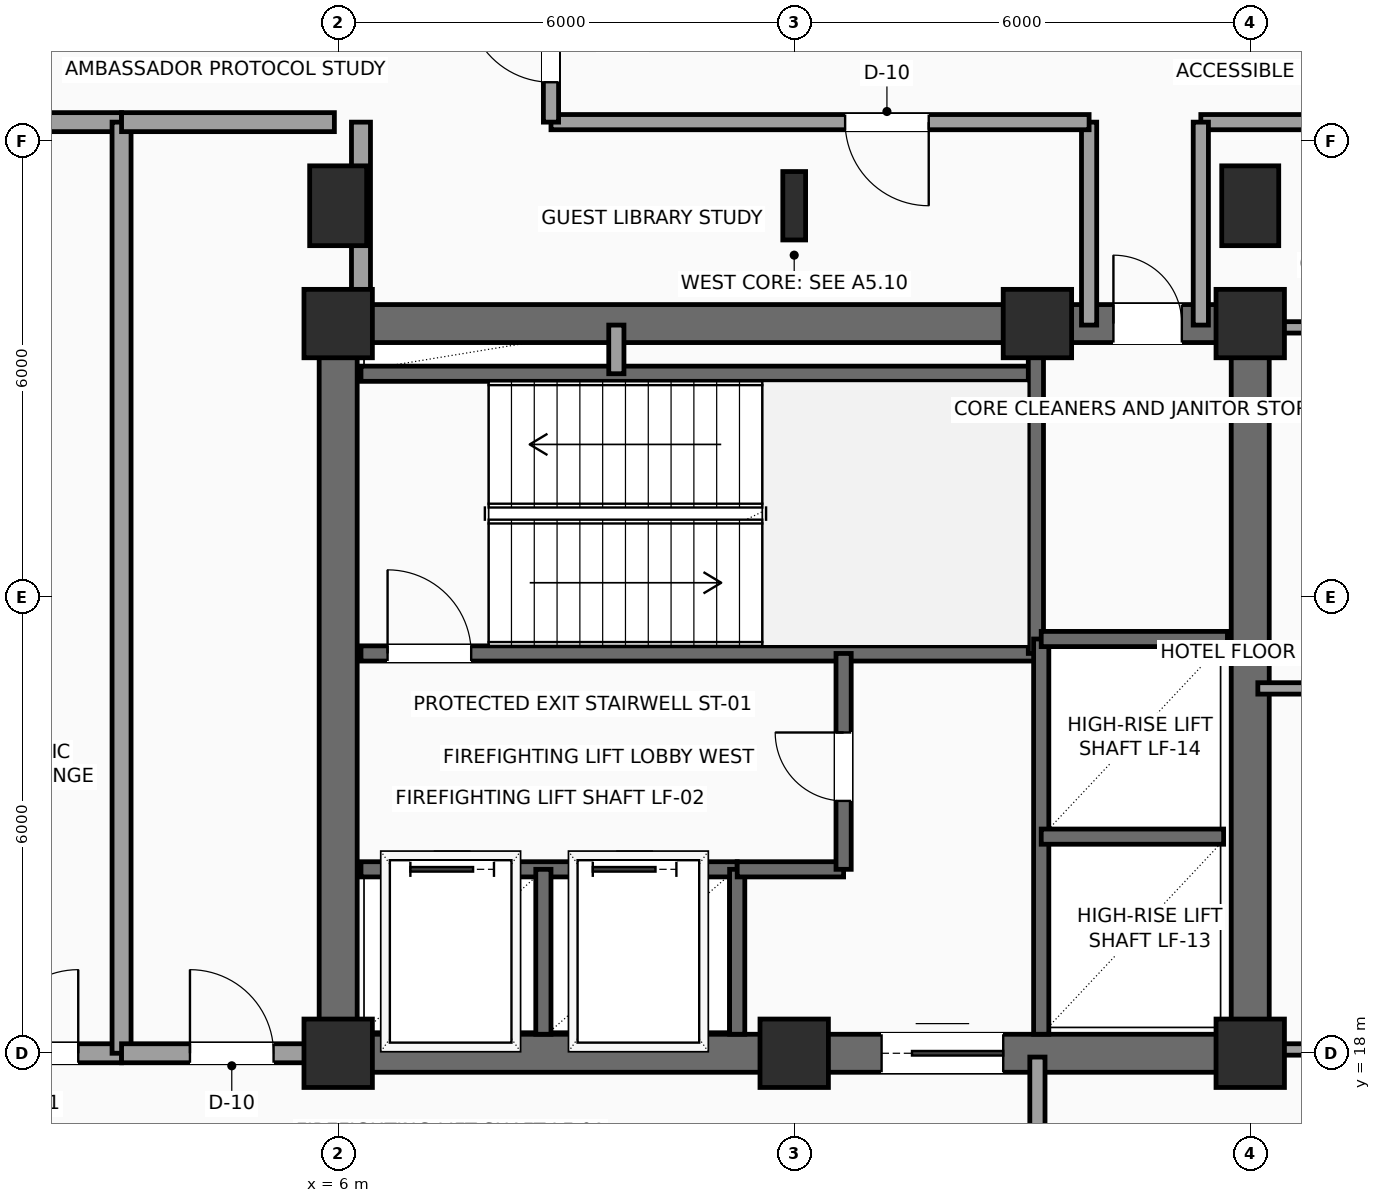
"""IFC4 building model, lengths in metres.
Left out: names, types, materials, properties, quantities, classifications, styles, units other than length and angle.
Written with IfcOpenShell. Run it as: python <this file> out.ifc"""

import sys

from ifc_helpers import new_model, si_unit, direction, frame, frame_2d, origin, origin_2d, place, context, subcontext, project, spatial, rectangle, i_section, extrude, element, fill, save


model = new_model("IFC4")
c1 = context("Model", 3, precision=1e-05, world=origin(), true_north=direction((0.0, 1.0)))
c2 = subcontext(c1, "Body", "Model", "MODEL_VIEW")
j1 = project(units=[si_unit("LENGTHUNIT", "METRE"), si_unit("PLANEANGLEUNIT", "RADIAN")], contexts=[c1])
p1 = place(None, origin())
s1 = spatial("IfcSite", under=j1, at=p1, CompositionType="ELEMENT")
p2 = place(p1, origin())
s2 = spatial("IfcBuilding", under=s1, at=p2, CompositionType="ELEMENT")
p3 = place(p2, frame((0.0, 0.0, 180.45)))
s3 = spatial("IfcBuildingStorey", under=s2, at=p3, CompositionType="ELEMENT", Elevation=180.45)
for number, where, z_axis, x_axis in (
    (1, (6.0, 18.0, 0.0), (0.0, 0.0, 1.0), (1.0, 0.0, 0.0)),
    (2, (12.0, 18.0, 0.0), (0.0, 0.0, 1.0), (1.0, 0.0, 0.0)),
    (3, (18.0, 18.0, 0.0), (0.0, 0.0, 1.0), (1.0, 0.0, 0.0)),
    (4, (6.0, 27.6, 0.0), (0.0, 0.0, 1.0), (1.0, 0.0, 0.0)),
    (5, (15.2, 27.6, 0.0), (0.0, 0.0, 1.0), (1.0, 0.0, 0.0)),
    (6, (18.0, 27.6, 0.0), (0.0, 0.0, 1.0), (1.0, 0.0, 0.0)),
):
    element("IfcColumn", number, at=place(p3, frame(where, z_axis=z_axis, x_axis=x_axis)), inside=s3, PredefinedType="COLUMN", context=c2, shape_type="SweptSolid", body=[
        extrude(rectangle(XDim=0.9, YDim=0.9, at=origin_2d()), origin(), (0.0, 0.0, 1.0), 3.75),
    ])
p4 = place(p3, frame((6.0, 29.15, 0.0), z_axis=(0.0, 0.0, 1.0), x_axis=(1.0, 0.0, 0.0)))
e7 = element("IfcColumn", 7, at=p4, inside=s3, PredefinedType="COLUMN", context=c2, shape_type="SweptSolid", body=[
    extrude(rectangle(XDim=0.75, YDim=1.05, at=origin_2d()), origin(), (0.0, 0.0, 1.0), 3.75),
])
p5 = place(p3, frame((12.0, 29.15, 0.0), z_axis=(0.0, 0.0, 1.0), x_axis=(1.0, 0.0, 0.0)))
e8 = element("IfcColumn", 8, at=p5, inside=s3, PredefinedType="COLUMN", context=c2, shape_type="SweptSolid", body=[
    extrude(i_section(OverallWidth=0.3, OverallDepth=0.9, WebThickness=0.019, FlangeThickness=0.035, FilletRadius=0.03, at=origin_2d()), origin(), (0.0, 0.0, 1.0), 3.75),
])
p6 = place(p3, frame((18.0, 29.15, 0.0), z_axis=(0.0, 0.0, 1.0), x_axis=(1.0, 0.0, 0.0)))
e9 = element("IfcColumn", 9, at=p6, inside=s3, PredefinedType="COLUMN", context=c2, shape_type="SweptSolid", body=[
    extrude(rectangle(XDim=0.75, YDim=1.05, at=origin_2d()), origin(), (0.0, 0.0, 1.0), 3.75),
])
p7 = place(p3, frame((6.0, 18.0, 0.0), z_axis=(0.0, 0.0, 1.0), x_axis=(1.0, 0.0, 0.0)))
e10 = element("IfcWall", 10, at=p7, inside=s3, PredefinedType="SHEAR", context=c2, shape_type="SweptSolid", body=[
    extrude(rectangle(XDim=12.0, YDim=0.5, at=frame_2d((6.0, 0.0))), origin(), (0.0, 0.0, 1.0), 3.54),
])
p8 = place(p7, frame((7.15, 0.0, 0.0)))
e11 = element("IfcOpeningElement", 11, at=p8, cuts=e10, PredefinedType="OPENING", context=c2, shape_type="SweptSolid", body=[
    extrude(rectangle(XDim=1.6, YDim=2.3, at=frame_2d((0.8, 1.15))), frame((0.0, 0.26, 0.0), z_axis=(0.0, -1.0, 0.0), x_axis=(1.0, 0.0, 0.0)), (0.0, 0.0, 1.0), 0.52),
])
p9 = place(p3, frame((6.0, 27.6, 0.0), z_axis=(0.0, 0.0, 1.0), x_axis=(1.0, 0.0, 0.0)))
e12 = element("IfcWall", 12, at=p9, inside=s3, PredefinedType="SHEAR", context=c2, shape_type="SweptSolid", body=[
    extrude(rectangle(XDim=12.0, YDim=0.5, at=frame_2d((6.0, 0.0))), origin(), (0.0, 0.0, 1.0), 3.54),
])
p10 = place(p9, frame((10.2, 0.0, 0.0)))
e13 = element("IfcOpeningElement", 13, at=p10, cuts=e12, PredefinedType="OPENING", context=c2, shape_type="SweptSolid", body=[
    extrude(rectangle(XDim=0.9, YDim=2.15, at=frame_2d((0.45, 1.075))), frame((0.0, 0.26, 0.0), z_axis=(0.0, -1.0, 0.0), x_axis=(1.0, 0.0, 0.0)), (0.0, 0.0, 1.0), 0.52),
])
for number, where, z_axis, x_axis in (
    (14, (6.0, 18.0, 0.0), (0.0, 0.0, 1.0), (0.0, 1.0, 0.0)),
    (15, (18.0, 18.0, 0.0), (0.0, 0.0, 1.0), (0.0, 1.0, 0.0)),
):
    element("IfcWall", number, at=place(p3, frame(where, z_axis=z_axis, x_axis=x_axis)), inside=s3, PredefinedType="SHEAR", context=c2, shape_type="SweptSolid", body=[
        extrude(rectangle(XDim=9.6, YDim=0.5, at=frame_2d((4.8, 0.0))), origin(), (0.0, 0.0, 1.0), 3.54),
    ])
p11 = place(p3, frame((6.3, 23.26, 0.0), z_axis=(0.0, 0.0, 1.0), x_axis=(1.0, 0.0, 0.0)))
e16 = element("IfcWall", 16, at=p11, inside=s3, PredefinedType="SHEAR", context=c2, shape_type="SweptSolid", body=[
    extrude(rectangle(XDim=8.88, YDim=0.2, at=frame_2d((4.44, 0.0))), origin(), (0.0, 0.0, 1.0), 3.54),
])
p12 = place(p11, frame((0.35, 0.0, 0.0)))
e17 = element("IfcOpeningElement", 17, at=p12, cuts=e16, PredefinedType="OPENING", context=c2, shape_type="SweptSolid", body=[
    extrude(rectangle(XDim=1.1, YDim=2.2, at=frame_2d((0.55, 1.1))), frame((0.0, 0.11, 0.0), z_axis=(0.0, -1.0, 0.0), x_axis=(1.0, 0.0, 0.0)), (0.0, 0.0, 1.0), 0.22),
])
p13 = place(p3, frame((6.3, 26.94, 0.0), z_axis=(0.0, 0.0, 1.0), x_axis=(1.0, 0.0, 0.0)))
e18 = element("IfcWall", 18, at=p13, inside=s3, PredefinedType="SHEAR", context=c2, shape_type="SweptSolid", body=[
    extrude(rectangle(XDim=8.88, YDim=0.2, at=frame_2d((4.44, 0.0))), origin(), (0.0, 0.0, 1.0), 3.54),
])
p14 = place(p3, frame((15.18, 23.26, 0.0), z_axis=(0.0, 0.0, 1.0), x_axis=(0.0, 1.0, 0.0)))
e19 = element("IfcWall", 19, at=p14, inside=s3, PredefinedType="SHEAR", context=c2, shape_type="SweptSolid", body=[
    extrude(rectangle(XDim=4.04, YDim=0.2, at=frame_2d((2.02, 0.0))), origin(), (0.0, 0.0, 1.0), 3.54),
])
p15 = place(p3, frame((6.3, 20.42, 0.0), z_axis=(0.0, 0.0, 1.0), x_axis=(1.0, 0.0, 0.0)))
e20 = element("IfcWall", 20, at=p15, inside=s3, PredefinedType="SHEAR", context=c2, shape_type="SweptSolid", body=[
    extrude(rectangle(XDim=4.95, YDim=0.2, at=frame_2d((2.475, 0.0))), origin(), (0.0, 0.0, 1.0), 3.54),
])
p16 = place(p15, frame((0.65, 0.0, 0.0)))
e21 = element("IfcOpeningElement", 21, at=p16, cuts=e20, PredefinedType="OPENING", context=c2, shape_type="SweptSolid", body=[
    extrude(rectangle(XDim=1.1, YDim=2.2, at=frame_2d((0.55, 1.1))), frame((0.0, 0.11, 0.0), z_axis=(0.0, -1.0, 0.0), x_axis=(1.0, 0.0, 0.0)), (0.0, 0.0, 1.0), 0.22),
])
p17 = place(p15, frame((3.05, 0.0, 0.0)))
e22 = element("IfcOpeningElement", 22, at=p17, cuts=e20, PredefinedType="OPENING", context=c2, shape_type="SweptSolid", body=[
    extrude(rectangle(XDim=1.1, YDim=2.2, at=frame_2d((0.55, 1.1))), frame((0.0, 0.11, 0.0), z_axis=(0.0, -1.0, 0.0), x_axis=(1.0, 0.0, 0.0)), (0.0, 0.0, 1.0), 0.22),
])
for number, where, z_axis, x_axis in (
    (23, (8.7, 18.25, 0.0), (0.0, 0.0, 1.0), (0.0, 1.0, 0.0)),
    (24, (11.25, 18.25, 0.0), (0.0, 0.0, 1.0), (0.0, 1.0, 0.0)),
):
    element("IfcWall", number, at=place(p3, frame(where, z_axis=z_axis, x_axis=x_axis)), inside=s3, PredefinedType="SHEAR", context=c2, shape_type="SweptSolid", body=[
        extrude(rectangle(XDim=2.17, YDim=0.2, at=frame_2d((1.085, 0.0))), origin(), (0.0, 0.0, 1.0), 3.54),
    ])
p18 = place(p3, frame((11.25, 20.42, 0.0), z_axis=(0.0, 0.0, 1.0), x_axis=(1.0, 0.0, 0.0)))
e25 = element("IfcWall", 25, at=p18, inside=s3, PredefinedType="SHEAR", context=c2, shape_type="SweptSolid", body=[
    extrude(rectangle(XDim=1.4, YDim=0.2, at=frame_2d((0.7, 0.0))), origin(), (0.0, 0.0, 1.0), 3.54),
])
p19 = place(p3, frame((12.65, 20.42, 0.0), z_axis=(0.0, 0.0, 1.0), x_axis=(0.0, 1.0, 0.0)))
e26 = element("IfcWall", 26, at=p19, inside=s3, PredefinedType="SHEAR", context=c2, shape_type="SweptSolid", body=[
    extrude(rectangle(XDim=2.84, YDim=0.2, at=frame_2d((1.42, 0.0))), origin(), (0.0, 0.0, 1.0), 3.54),
])
p20 = place(p19, frame((0.9, 0.0, 0.0)))
e27 = element("IfcOpeningElement", 27, at=p20, cuts=e26, PredefinedType="OPENING", context=c2, shape_type="SweptSolid", body=[
    extrude(rectangle(XDim=0.9, YDim=2.15, at=frame_2d((0.45, 1.075))), frame((0.0, 0.11, 0.0), z_axis=(0.0, -1.0, 0.0), x_axis=(1.0, 0.0, 0.0)), (0.0, 0.0, 1.0), 0.22),
])
p21 = place(p3, frame((9.66, 26.94, 0.0), z_axis=(0.0, 0.0, 1.0), x_axis=(0.0, 1.0, 0.0)))
e28 = element("IfcWall", 28, at=p21, inside=s3, PredefinedType="SOLIDWALL", context=c2, shape_type="SweptSolid", body=[
    extrude(rectangle(XDim=0.64, YDim=0.2, at=frame_2d((0.32, 0.0))), origin(), (0.0, 0.0, 1.0), 3.54),
])
p22 = place(p3, frame((15.25, 18.25, 0.0), z_axis=(0.0, 0.0, 1.0), x_axis=(0.0, 1.0, 0.0)))
e29 = element("IfcWall", 29, at=p22, inside=s3, PredefinedType="SHEAR", context=c2, shape_type="SweptSolid", body=[
    extrude(rectangle(XDim=5.2, YDim=0.2, at=frame_2d((2.6, 0.0))), origin(), (0.0, 0.0, 1.0), 3.54),
])
p23 = place(p3, frame((15.25, 20.85, 0.0), z_axis=(0.0, 0.0, 1.0), x_axis=(1.0, 0.0, 0.0)))
e30 = element("IfcWall", 30, at=p23, inside=s3, PredefinedType="SHEAR", context=c2, shape_type="SweptSolid", body=[
    extrude(rectangle(XDim=2.4, YDim=0.2, at=frame_2d((1.2, 0.0))), origin(), (0.0, 0.0, 1.0), 3.54),
])
p24 = place(p3, frame((15.25, 23.45, 0.0), z_axis=(0.0, 0.0, 1.0), x_axis=(1.0, 0.0, 0.0)))
e31 = element("IfcWall", 31, at=p24, inside=s3, PredefinedType="SHEAR", context=c2, shape_type="SweptSolid", body=[
    extrude(rectangle(XDim=2.45, YDim=0.2, at=frame_2d((1.225, 0.0))), origin(), (0.0, 0.0, 1.0), 3.54),
])
p25 = place(p3, frame((15.2, 17.95, 0.0), z_axis=(0.0, 0.0, 1.0), x_axis=(0.0, -1.0, 0.0)))
e32 = element("IfcWall", 32, at=p25, inside=s3, PredefinedType="SOLIDWALL", context=c2, shape_type="SweptSolid", body=[
    extrude(rectangle(XDim=1.7, YDim=0.2, at=frame_2d((0.85, 0.0))), origin(), (0.0, 0.0, 1.0), 3.54),
])
p26 = place(p3, frame((21.45, 30.25, 0.0), z_axis=(0.0, 0.0, 1.0), x_axis=(-1.0, 0.0, 0.0)))
e33 = element("IfcWall", 33, at=p26, inside=s3, PredefinedType="SOLIDWALL", context=c2, shape_type="SweptSolid", body=[
    extrude(rectangle(XDim=4.1, YDim=0.2, at=frame_2d((2.05, 0.0))), origin(), (0.0, 0.0, 1.0), 3.54),
])
p27 = place(p26, frame((1.55, 0.0, 0.0)))
e34 = element("IfcOpeningElement", 34, at=p27, cuts=e33, PredefinedType="OPENING", context=c2, shape_type="SweptSolid", body=[
    extrude(rectangle(XDim=1.1, YDim=2.25, at=frame_2d((0.55, 1.125))), frame((0.0, 0.11, 0.0), z_axis=(0.0, -1.0, 0.0), x_axis=(1.0, 0.0, 0.0)), (0.0, 0.0, 1.0), 0.22),
])
for number, where, z_axis, x_axis in (
    (35, (17.35, 30.25, 0.0), (0.0, 0.0, 1.0), (0.0, -1.0, 0.0)),
    (36, (15.88, 27.58, 0.0), (0.0, 0.0, 1.0), (0.0, 1.0, 0.0)),
):
    element("IfcWall", number, at=place(p3, frame(where, z_axis=z_axis, x_axis=x_axis)), inside=s3, PredefinedType="SOLIDWALL", context=c2, shape_type="SweptSolid", body=[
        extrude(rectangle(XDim=2.67, YDim=0.2, at=frame_2d((1.335, 0.0))), origin(), (0.0, 0.0, 1.0), 3.54),
    ])
p28 = place(p3, frame((15.88, 30.25, 0.0), z_axis=(0.0, 0.0, 1.0), x_axis=(-1.0, 0.0, 0.0)))
e37 = element("IfcWall", 37, at=p28, inside=s3, PredefinedType="SOLIDWALL", context=c2, shape_type="SweptSolid", body=[
    extrude(rectangle(XDim=7.08, YDim=0.2, at=frame_2d((3.54, 0.0))), origin(), (0.0, 0.0, 1.0), 3.54),
])
p29 = place(p28, frame((2.11, 0.0, 0.0)))
e38 = element("IfcOpeningElement", 38, at=p29, cuts=e37, PredefinedType="OPENING", context=c2, shape_type="SweptSolid", body=[
    extrude(rectangle(XDim=1.1, YDim=2.25, at=frame_2d((0.55, 1.125))), frame((0.0, 0.11, 0.0), z_axis=(0.0, -1.0, 0.0), x_axis=(1.0, 0.0, 0.0)), (0.0, 0.0, 1.0), 0.22),
])
p30 = place(p3, frame((8.8, 30.25, 0.0), z_axis=(0.0, 0.0, 1.0), x_axis=(0.0, 1.0, 0.0)))
e39 = element("IfcWall", 39, at=p30, inside=s3, PredefinedType="SOLIDWALL", context=c2, shape_type="SweptSolid", body=[
    extrude(rectangle(XDim=2.05, YDim=0.2, at=frame_2d((1.025, 0.0))), origin(), (0.0, 0.0, 1.0), 3.54),
])
p31 = place(p30, frame((0.525, 0.0, 0.0)))
e40 = element("IfcOpeningElement", 40, at=p31, cuts=e39, PredefinedType="OPENING", context=c2, shape_type="SweptSolid", body=[
    extrude(rectangle(XDim=1.1, YDim=2.25, at=frame_2d((0.55, 1.125))), frame((0.0, 0.11, 0.0), z_axis=(0.0, -1.0, 0.0), x_axis=(1.0, 0.0, 0.0)), (0.0, 0.0, 1.0), 0.22),
])
p32 = place(p3, frame((18.1, 18.05, 0.0), z_axis=(0.0, 0.0, 1.0), x_axis=(1.0, 0.0, 0.0)))
e41 = element("IfcWall", 41, at=p32, inside=s3, PredefinedType="PARTITIONING", context=c2, shape_type="SweptSolid", body=[
    extrude(rectangle(XDim=3.25, YDim=0.15, at=frame_2d((1.625, 0.0))), origin(), (0.0, 0.0, 1.0), 3.132),
])
for number, where, z_axis, x_axis in (
    (42, (18.1, 22.8, 0.0), (0.0, 0.0, 1.0), (1.0, 0.0, 0.0)),
    (43, (18.1, 27.55, 0.0), (0.0, 0.0, 1.0), (1.0, 0.0, 0.0)),
):
    element("IfcWall", number, at=place(p3, frame(where, z_axis=z_axis, x_axis=x_axis)), inside=s3, PredefinedType="PARTITIONING", context=c2, shape_type="SweptSolid", body=[
        extrude(rectangle(XDim=3.25, YDim=0.15, at=frame_2d((1.625, 0.0))), origin(), (0.0, 0.0, 1.0), 3.54),
    ])
p33 = place(p3, frame((0.3, 18.0, 0.0), z_axis=(0.0, 0.0, 1.0), x_axis=(1.0, 0.0, 0.0)))
e44 = element("IfcWall", 44, at=p33, inside=s3, PredefinedType="PARTITIONING", context=c2, shape_type="SweptSolid", body=[
    extrude(rectangle(XDim=2.85, YDim=0.25, at=frame_2d((1.425, 0.0))), origin(), (0.0, 0.0, 1.0), 3.132),
])
p34 = place(p33, frame((1.18, 0.0, 0.0)))
e45 = element("IfcOpeningElement", 45, at=p34, cuts=e44, PredefinedType="OPENING", context=c2, shape_type="SweptSolid", body=[
    extrude(rectangle(XDim=1.1, YDim=2.25, at=frame_2d((0.55, 1.125))), frame((0.0, 0.135, 0.0), z_axis=(0.0, -1.0, 0.0), x_axis=(1.0, 0.0, 0.0)), (0.0, 0.0, 1.0), 0.27),
])
p35 = place(p3, frame((0.3, 30.25, 0.0), z_axis=(0.0, 0.0, 1.0), x_axis=(1.0, 0.0, 0.0)))
e46 = element("IfcWall", 46, at=p35, inside=s3, PredefinedType="PARTITIONING", context=c2, shape_type="SweptSolid", body=[
    extrude(rectangle(XDim=2.85, YDim=0.25, at=frame_2d((1.425, 0.0))), origin(), (0.0, 0.0, 1.0), 3.54),
])
p36 = place(p3, frame((3.15, 18.0, 0.0), z_axis=(0.0, 0.0, 1.0), x_axis=(0.0, 1.0, 0.0)))
e47 = element("IfcWall", 47, at=p36, inside=s3, PredefinedType="PARTITIONING", context=c2, shape_type="SweptSolid", body=[
    extrude(rectangle(XDim=12.25, YDim=0.25, at=frame_2d((6.125, 0.0))), origin(), (0.0, 0.0, 1.0), 3.54),
])
p37 = place(p3, frame((3.15, 18.0, 0.0), z_axis=(0.0, 0.0, 1.0), x_axis=(1.0, 0.0, 0.0)))
e48 = element("IfcWall", 48, at=p37, inside=s3, PredefinedType="PARTITIONING", context=c2, shape_type="SweptSolid", body=[
    extrude(rectangle(XDim=2.8, YDim=0.25, at=frame_2d((1.4, 0.0))), origin(), (0.0, 0.0, 1.0), 3.132),
])
p38 = place(p37, frame((0.9, 0.0, 0.0)))
e49 = element("IfcOpeningElement", 49, at=p38, cuts=e48, PredefinedType="OPENING", context=c2, shape_type="SweptSolid", body=[
    extrude(rectangle(XDim=1.1, YDim=2.25, at=frame_2d((0.55, 1.125))), frame((0.0, 0.135, 0.0), z_axis=(0.0, -1.0, 0.0), x_axis=(1.0, 0.0, 0.0)), (0.0, 0.0, 1.0), 0.27),
])
p39 = place(p3, frame((3.15, 30.25, 0.0), z_axis=(0.0, 0.0, 1.0), x_axis=(1.0, 0.0, 0.0)))
e50 = element("IfcWall", 50, at=p39, inside=s3, PredefinedType="PARTITIONING", context=c2, shape_type="SweptSolid", body=[
    extrude(rectangle(XDim=2.8, YDim=0.25, at=frame_2d((1.4, 0.0))), origin(), (0.0, 0.0, 1.0), 3.54),
])
p40 = place(p3, frame((6.3, 27.65, 0.0), z_axis=(0.0, 0.0, 1.0), x_axis=(0.0, 1.0, 0.0)))
e51 = element("IfcWall", 51, at=p40, inside=s3, PredefinedType="PARTITIONING", context=c2, shape_type="SweptSolid", body=[
    extrude(rectangle(XDim=2.6, YDim=0.25, at=frame_2d((1.3, 0.0))), origin(), (0.0, 0.0, 1.0), 3.132),
])
p41 = place(p8, origin())
e52 = element("IfcDoor", 52, at=p41, inside=s3, OperationType="DOUBLE_DOOR_SLIDING", PredefinedType="DOOR", context=c2, shape_type="SweptSolid", body=[
    extrude(rectangle(XDim=1.6, YDim=2.3, at=frame_2d((0.8, 1.15))), frame((0.0, 0.025, 0.0), z_axis=(0.0, -1.0, 0.0), x_axis=(1.0, 0.0, 0.0)), (0.0, 0.0, 1.0), 0.05),
])
fill(e11, e52)
p42 = place(p10, origin())
e53 = element("IfcDoor", 53, at=p42, inside=s3, OperationType="SINGLE_SWING_LEFT", PredefinedType="DOOR", context=c2, shape_type="SweptSolid", body=[
    extrude(rectangle(XDim=0.9, YDim=2.15, at=frame_2d((0.45, 1.075))), frame((0.0, 0.025, 0.0), z_axis=(0.0, -1.0, 0.0), x_axis=(1.0, 0.0, 0.0)), (0.0, 0.0, 1.0), 0.05),
])
fill(e13, e53)
p43 = place(p12, origin())
e54 = element("IfcDoor", 54, at=p43, inside=s3, OperationType="SINGLE_SWING_LEFT", PredefinedType="DOOR", context=c2, shape_type="SweptSolid", body=[
    extrude(rectangle(XDim=1.1, YDim=2.2, at=frame_2d((0.55, 1.1))), frame((0.0, 0.025, 0.0), z_axis=(0.0, -1.0, 0.0), x_axis=(1.0, 0.0, 0.0)), (0.0, 0.0, 1.0), 0.05),
])
fill(e17, e54)
p44 = place(p16, origin())
e55 = element("IfcDoor", 55, at=p44, inside=s3, OperationType="SLIDING_TO_LEFT", PredefinedType="DOOR", context=c2, shape_type="SweptSolid", body=[
    extrude(rectangle(XDim=1.1, YDim=2.2, at=frame_2d((0.55, 1.1))), frame((0.0, 0.025, 0.0), z_axis=(0.0, -1.0, 0.0), x_axis=(1.0, 0.0, 0.0)), (0.0, 0.0, 1.0), 0.05),
])
fill(e21, e55)
p45 = place(p17, origin())
e56 = element("IfcDoor", 56, at=p45, inside=s3, OperationType="SLIDING_TO_LEFT", PredefinedType="DOOR", context=c2, shape_type="SweptSolid", body=[
    extrude(rectangle(XDim=1.1, YDim=2.2, at=frame_2d((0.55, 1.1))), frame((0.0, 0.025, 0.0), z_axis=(0.0, -1.0, 0.0), x_axis=(1.0, 0.0, 0.0)), (0.0, 0.0, 1.0), 0.05),
])
fill(e22, e56)
p46 = place(p20, origin())
e57 = element("IfcDoor", 57, at=p46, inside=s3, OperationType="SINGLE_SWING_RIGHT", PredefinedType="DOOR", context=c2, shape_type="SweptSolid", body=[
    extrude(rectangle(XDim=0.9, YDim=2.15, at=frame_2d((0.45, 1.075))), frame((0.0, 0.025, 0.0), z_axis=(0.0, -1.0, 0.0), x_axis=(1.0, 0.0, 0.0)), (0.0, 0.0, 1.0), 0.05),
])
fill(e27, e57)
p47 = place(p29, origin())
e58 = element("IfcDoor", 58, at=p47, inside=s3, OperationType="SINGLE_SWING_LEFT", PredefinedType="DOOR", context=c2, shape_type="SweptSolid", body=[
    extrude(rectangle(XDim=1.1, YDim=2.25, at=frame_2d((0.55, 1.125))), frame((0.0, 0.025, 0.0), z_axis=(0.0, -1.0, 0.0), x_axis=(1.0, 0.0, 0.0)), (0.0, 0.0, 1.0), 0.05),
])
fill(e38, e58)
p48 = place(p31, origin())
e59 = element("IfcDoor", 59, at=p48, inside=s3, OperationType="SINGLE_SWING_RIGHT", PredefinedType="DOOR", context=c2, shape_type="SweptSolid", body=[
    extrude(rectangle(XDim=1.1, YDim=2.25, at=frame_2d((0.55, 1.125))), frame((0.0, 0.025, 0.0), z_axis=(0.0, -1.0, 0.0), x_axis=(1.0, 0.0, 0.0)), (0.0, 0.0, 1.0), 0.05),
])
fill(e40, e59)
p49 = place(p34, origin())
e60 = element("IfcDoor", 60, at=p49, inside=s3, OperationType="SINGLE_SWING_RIGHT", PredefinedType="DOOR", context=c2, shape_type="SweptSolid", body=[
    extrude(rectangle(XDim=1.1, YDim=2.25, at=frame_2d((0.55, 1.125))), frame((0.0, 0.025, 0.0), z_axis=(0.0, -1.0, 0.0), x_axis=(1.0, 0.0, 0.0)), (0.0, 0.0, 1.0), 0.05),
])
fill(e45, e60)
p50 = place(p38, origin())
e61 = element("IfcDoor", 61, at=p50, inside=s3, OperationType="SINGLE_SWING_LEFT", PredefinedType="DOOR", context=c2, shape_type="SweptSolid", body=[
    extrude(rectangle(XDim=1.1, YDim=2.25, at=frame_2d((0.55, 1.125))), frame((0.0, 0.025, 0.0), z_axis=(0.0, -1.0, 0.0), x_axis=(1.0, 0.0, 0.0)), (0.0, 0.0, 1.0), 0.05),
])
fill(e49, e61)
save(model, sys.argv[1])
